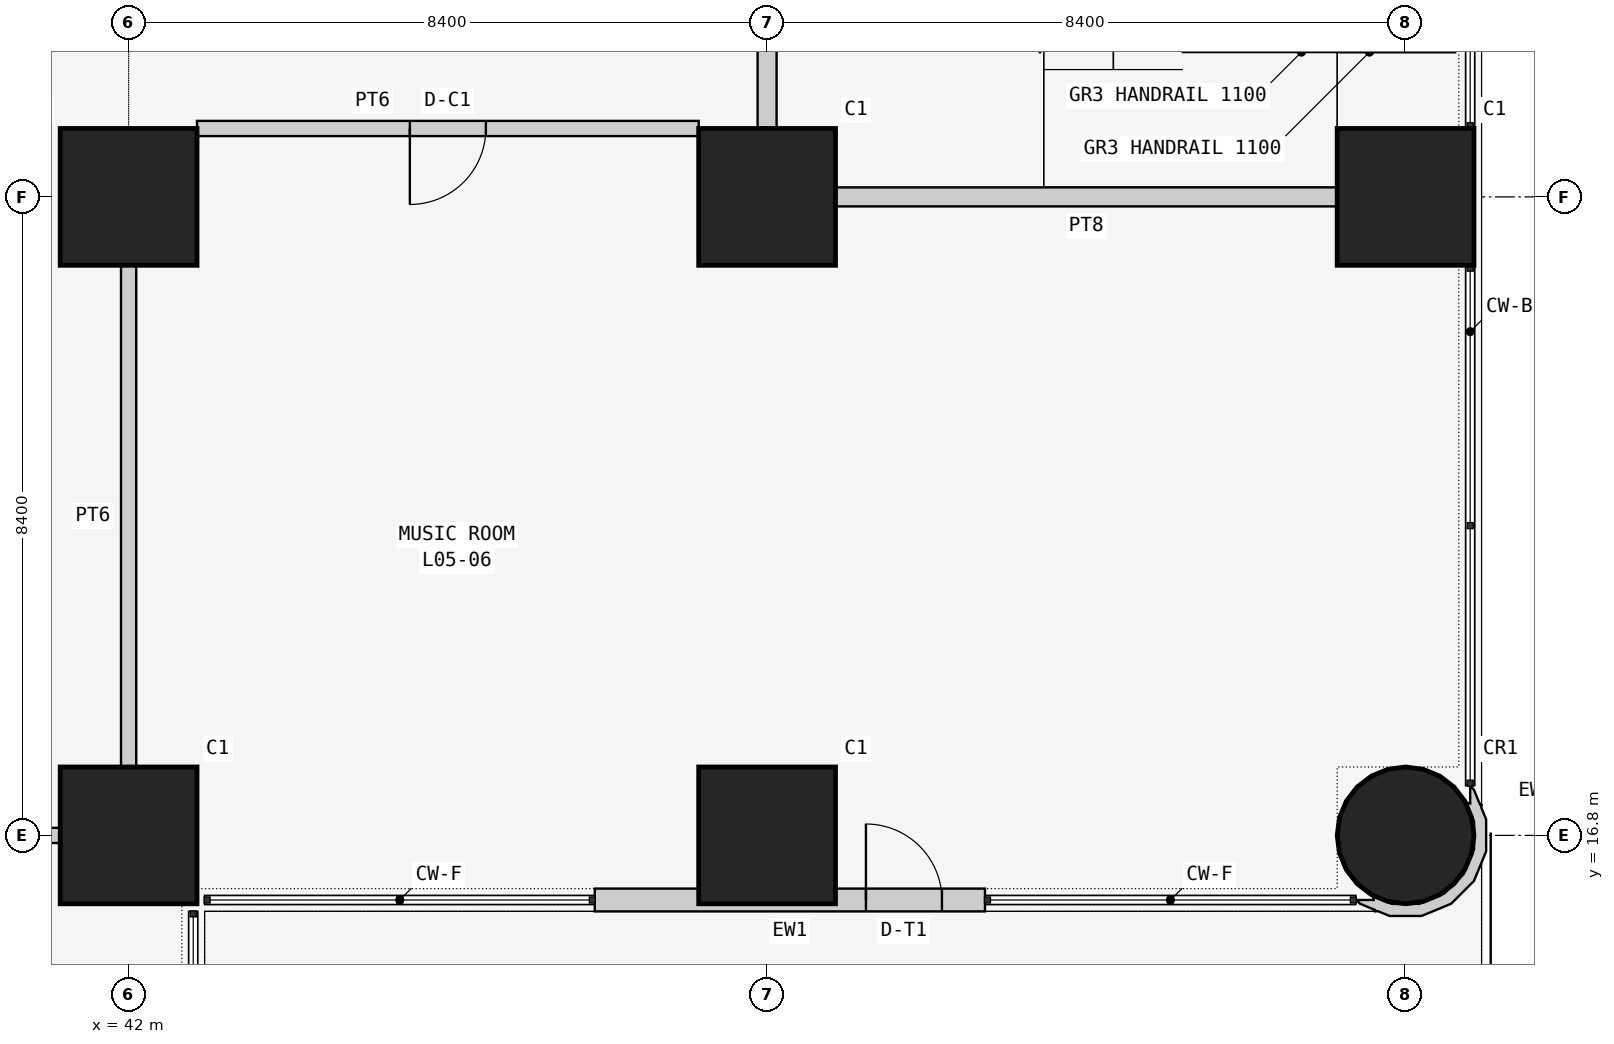
"""IFC4 building model, lengths in metres.
Left out: names, types, materials, properties, quantities, classifications, styles, units other than length and angle.
Written with IfcOpenShell. Run it as: python <this file> out.ifc"""

import sys

from ifc_helpers import new_model, si_unit, direction, frame, frame_2d, origin, origin_2d, place, context, subcontext, project, spatial, polyline, rectangle, circle, outline, extrude, element, fill, save


model = new_model("IFC4")
c1 = context("Model", 3, precision=1e-05, world=origin(), true_north=direction((0.0, 1.0)))
c2 = subcontext(c1, "Body", "Model", "MODEL_VIEW")
j1 = project(units=[si_unit("LENGTHUNIT", "METRE"), si_unit("PLANEANGLEUNIT", "RADIAN")], contexts=[c1])
p1 = place(None, origin())
s1 = spatial("IfcSite", under=j1, at=p1, CompositionType="ELEMENT")
p2 = place(p1, origin())
s2 = spatial("IfcBuilding", under=s1, at=p2, CompositionType="ELEMENT")
p3 = place(p2, frame((0.0, 0.0, 24.0)))
s3 = spatial("IfcBuildingStorey", under=s2, at=p3, CompositionType="ELEMENT", Elevation=24.0)
for number, where, z_axis, x_axis in (
    (1, (42.0, 16.8, 0.0), (0.0, 0.0, 1.0), (1.0, 0.0, 0.0)),
    (2, (42.0, 25.2, 0.0), (0.0, 0.0, 1.0), (1.0, 0.0, 0.0)),
    (3, (50.4, 16.8, 0.0), (0.0, 0.0, 1.0), (1.0, 0.0, 0.0)),
    (4, (50.4, 25.2, 0.0), (0.0, 0.0, 1.0), (1.0, 0.0, 0.0)),
):
    element("IfcColumn", number, at=place(p3, frame(where, z_axis=z_axis, x_axis=x_axis)), inside=s3, PredefinedType="COLUMN", context=c2, shape_type="SweptSolid", body=[
        extrude(rectangle(XDim=1.8, YDim=1.8, at=origin_2d()), origin(), (0.0, 0.0, 1.0), 4.5),
    ])
p4 = place(p3, frame((58.8, 16.8, 0.0), z_axis=(0.0, 0.0, 1.0), x_axis=(1.0, 0.0, 0.0)))
e5 = element("IfcColumn", 5, at=p4, inside=s3, PredefinedType="COLUMN", context=c2, shape_type="SweptSolid", body=[
    extrude(circle(Radius=0.9, at=origin_2d()), origin(), (0.0, 0.0, 1.0), 4.5),
])
p5 = place(p3, frame((58.8, 25.2, 0.0), z_axis=(0.0, 0.0, 1.0), x_axis=(1.0, 0.0, 0.0)))
e6 = element("IfcColumn", 6, at=p5, inside=s3, PredefinedType="COLUMN", context=c2, shape_type="SweptSolid", body=[
    extrude(rectangle(XDim=1.8, YDim=1.8, at=origin_2d()), origin(), (0.0, 0.0, 1.0), 4.5),
])
p6 = place(p3, frame((48.133, 15.95, 0.0), z_axis=(0.0, 0.0, 1.0), x_axis=(1.0, 0.0, 0.0)))
e7 = element("IfcWall", 7, at=p6, inside=s3, PredefinedType="SOLIDWALL", context=c2, shape_type="SweptSolid", body=[
    extrude(rectangle(XDim=5.133, YDim=0.3, at=frame_2d((2.567, 0.0))), origin(), (0.0, 0.0, 1.0), 4.25),
])
p7 = place(p6, frame((3.567, 0.0, 0.0)))
e8 = element("IfcOpeningElement", 8, at=p7, cuts=e7, PredefinedType="OPENING", context=c2, shape_type="SweptSolid", body=[
    extrude(rectangle(XDim=1.0, YDim=2.4, at=frame_2d((0.5, 1.2))), frame((0.0, 0.16, 0.0), z_axis=(0.0, -1.0, 0.0), x_axis=(1.0, 0.0, 0.0)), (0.0, 0.0, 1.0), 0.32),
])
p8 = place(p3, frame((58.205, 16.021, 0.0), z_axis=(0.0, 0.0, 1.0), x_axis=(0.707106781187, -0.707106781187, 0.0)))
e9 = element("IfcWall", 9, at=p8, inside=s3, PredefinedType="SOLIDWALL", context=c2, shape_type="SweptSolid", body=[
    extrude(outline(polyline([(0.294, 1.961), (0.278, 1.949), (0.081, 2.031), (0.012, 2.031), (0.174, 1.869), (0.133, 1.838), (0.38, 1.735), (0.634, 1.482), (0.771, 1.15), (0.771, 0.792), (0.634, 0.461), (0.38, 0.207), (0.133, 0.105), (0.174, 0.074), (0.012, -0.089), (0.081, -0.089), (0.279, -0.007), (0.294, -0.019), (0.315, 0.008), (0.47, 0.073), (0.768, 0.371), (0.93, 0.76), (0.93, 1.182), (0.769, 1.572), (0.47, 1.87), (0.315, 1.935), (0.294, 1.961)])), origin(), (0.0, 0.0, 1.0), 4.25),
])
p9 = place(p3, frame((57.9, 25.2, 0.0), z_axis=(0.0, 0.0, 1.0), x_axis=(-1.0, 0.0, 0.0)))
e10 = element("IfcWall", 10, at=p9, inside=s3, PredefinedType="SOLIDWALL", context=c2, shape_type="SweptSolid", body=[
    extrude(rectangle(XDim=6.6, YDim=0.25, at=frame_2d((3.3, 0.0))), origin(), (0.0, 0.0, 1.0), 3.409),
])
p10 = place(p3, frame((50.4, 26.1, 0.0), z_axis=(0.0, 0.0, 1.0), x_axis=(0.0, 1.0, 0.0)))
e11 = element("IfcWall", 11, at=p10, inside=s3, PredefinedType="SOLIDWALL", context=c2, shape_type="SweptSolid", body=[
    extrude(rectangle(XDim=6.6, YDim=0.25, at=frame_2d((3.3, 0.0))), origin(), (0.0, 0.0, 1.0), 3.409),
])
p11 = place(p10, frame((2.0, 0.0, 0.0)))
e12 = element("IfcOpeningElement", 12, at=p11, cuts=e11, PredefinedType="OPENING", context=c2, shape_type="SweptSolid", body=[
    extrude(rectangle(XDim=2.6, YDim=2.4, at=frame_2d((1.3, 1.2))), frame((0.0, 0.135, 0.0), z_axis=(0.0, -1.0, 0.0), x_axis=(1.0, 0.0, 0.0)), (0.0, 0.0, 1.0), 0.27),
])
p12 = place(p3, frame((38.3, 16.8, 0.0), z_axis=(0.0, 0.0, 1.0), x_axis=(1.0, 0.0, 0.0)))
e13 = element("IfcWall", 13, at=p12, inside=s3, PredefinedType="PARTITIONING", context=c2, shape_type="SweptSolid", body=[
    extrude(rectangle(XDim=2.8, YDim=0.2, at=frame_2d((1.4, 0.0))), origin(), (0.0, 0.0, 1.0), 3.409),
])
p13 = place(p3, frame((42.9, 26.1, 0.0), z_axis=(0.0, 0.0, 1.0), x_axis=(1.0, 0.0, 0.0)))
e14 = element("IfcWall", 14, at=p13, inside=s3, PredefinedType="PARTITIONING", context=c2, shape_type="SweptSolid", body=[
    extrude(rectangle(XDim=6.6, YDim=0.2, at=frame_2d((3.3, 0.0))), origin(), (0.0, 0.0, 1.0), 4.25),
])
p14 = place(p13, frame((2.8, 0.0, 0.0)))
e15 = element("IfcOpeningElement", 15, at=p14, cuts=e14, PredefinedType="OPENING", context=c2, shape_type="SweptSolid", body=[
    extrude(rectangle(XDim=1.0, YDim=2.1, at=frame_2d((0.5, 1.05))), frame((0.0, 0.11, 0.0), z_axis=(0.0, -1.0, 0.0), x_axis=(1.0, 0.0, 0.0)), (0.0, 0.0, 1.0), 0.22),
])
p15 = place(p3, frame((42.0, 17.7, 0.0), z_axis=(0.0, 0.0, 1.0), x_axis=(0.0, 1.0, 0.0)))
e16 = element("IfcWall", 16, at=p15, inside=s3, PredefinedType="PARTITIONING", context=c2, shape_type="SweptSolid", body=[
    extrude(rectangle(XDim=6.6, YDim=0.2, at=frame_2d((3.3, 0.0))), origin(), (0.0, 0.0, 1.0), 3.409),
])
p16 = place(p7, origin())
e17 = element("IfcDoor", 17, at=p16, inside=s3, OperationType="SINGLE_SWING_LEFT", PredefinedType="DOOR", context=c2, shape_type="SweptSolid", body=[
    extrude(rectangle(XDim=1.0, YDim=2.4, at=frame_2d((0.5, 1.2))), frame((0.0, 0.025, 0.0), z_axis=(0.0, -1.0, 0.0), x_axis=(1.0, 0.0, 0.0)), (0.0, 0.0, 1.0), 0.05),
])
fill(e8, e17)
p17 = place(p14, frame((1.0, 0.0, 0.0), z_axis=(0.0, 0.0, 1.0), x_axis=(-1.0, 0.0, 0.0)))
e18 = element("IfcDoor", 18, at=p17, inside=s3, OperationType="SINGLE_SWING_RIGHT", PredefinedType="DOOR", context=c2, shape_type="SweptSolid", body=[
    extrude(rectangle(XDim=1.0, YDim=2.1, at=frame_2d((0.5, 1.05))), frame((0.0, 0.025, 0.0), z_axis=(0.0, -1.0, 0.0), x_axis=(1.0, 0.0, 0.0)), (0.0, 0.0, 1.0), 0.05),
])
fill(e15, e18)
save(model, sys.argv[1])
